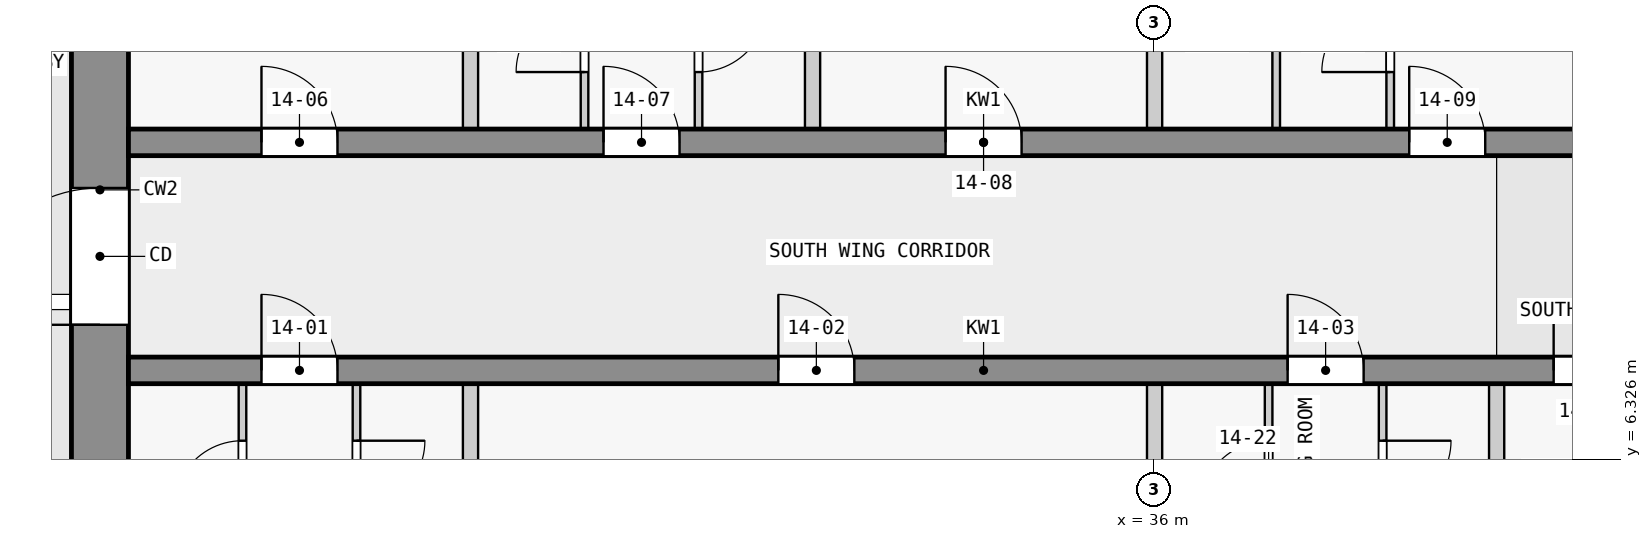
"""IFC4 building model, lengths in metres.
Left out: names, types, materials, properties, quantities, classifications, styles, units other than length and angle.
Written with IfcOpenShell. Run it as: python <this file> out.ifc"""

import sys

from ifc_helpers import new_model, si_unit, direction, frame, frame_2d, origin, place, context, subcontext, project, spatial, rectangle, extrude, element, fill, save


model = new_model("IFC4")
c1 = context("Model", 3, precision=1e-05, world=origin(), true_north=direction((0.0, 1.0)))
c2 = subcontext(c1, "Body", "Model", "MODEL_VIEW")
j1 = project(units=[si_unit("LENGTHUNIT", "METRE"), si_unit("PLANEANGLEUNIT", "RADIAN")], contexts=[c1])
p1 = place(None, origin())
s1 = spatial("IfcSite", under=j1, at=p1, CompositionType="ELEMENT")
p2 = place(p1, origin())
s2 = spatial("IfcBuilding", under=s1, at=p2, CompositionType="ELEMENT")
p3 = place(p2, frame((0.0, 0.0, 58.3)))
s3 = spatial("IfcBuildingStorey", under=s2, at=p3, CompositionType="ELEMENT", Elevation=58.3)
p4 = place(p3, frame((22.125, 2.5, 0.0), z_axis=(0.0, 0.0, 1.0), x_axis=(0.0, 1.0, 0.0)))
e1 = element("IfcWall", 1, at=p4, inside=s3, PredefinedType="SHEAR", context=c2, shape_type="SweptSolid", body=[
    extrude(rectangle(XDim=14.75, YDim=0.75, at=frame_2d((7.375, 0.0))), origin(), (0.0, 0.0, 1.0), 3.25),
])
p5 = place(p4, frame((5.6, 0.0, 0.0)))
e2 = element("IfcOpeningElement", 2, at=p5, cuts=e1, PredefinedType="OPENING", context=c2, shape_type="SweptSolid", body=[
    extrude(rectangle(XDim=1.8, YDim=2.1, at=frame_2d((0.9, 1.05))), frame((0.0, 0.385, 0.0), z_axis=(0.0, -1.0, 0.0), x_axis=(1.0, 0.0, 0.0)), (0.0, 0.0, 1.0), 0.77),
])
p6 = place(p3, frame((22.5, 7.5, 0.0), z_axis=(0.0, 0.0, 1.0), x_axis=(1.0, 0.0, 0.0)))
e3 = element("IfcWall", 3, at=p6, inside=s3, PredefinedType="SHEAR", context=c2, shape_type="SweptSolid", body=[
    extrude(rectangle(XDim=22.5, YDim=0.35, at=frame_2d((11.25, 0.0))), origin(), (0.0, 0.0, 1.0), 3.25),
])
p7 = place(p6, frame((1.75, 0.0, 0.0)))
e4 = element("IfcOpeningElement", 4, at=p7, cuts=e3, PredefinedType="OPENING", context=c2, shape_type="SweptSolid", body=[
    extrude(rectangle(XDim=1.0, YDim=2.1, at=frame_2d((0.5, 1.05))), frame((0.0, 0.185, 0.0), z_axis=(0.0, -1.0, 0.0), x_axis=(1.0, 0.0, 0.0)), (0.0, 0.0, 1.0), 0.37),
])
p8 = place(p6, frame((8.55, 0.0, 0.0)))
e5 = element("IfcOpeningElement", 5, at=p8, cuts=e3, PredefinedType="OPENING", context=c2, shape_type="SweptSolid", body=[
    extrude(rectangle(XDim=1.0, YDim=2.1, at=frame_2d((0.5, 1.05))), frame((0.0, 0.185, 0.0), z_axis=(0.0, -1.0, 0.0), x_axis=(1.0, 0.0, 0.0)), (0.0, 0.0, 1.0), 0.37),
])
p9 = place(p6, frame((15.25, 0.0, 0.0)))
e6 = element("IfcOpeningElement", 6, at=p9, cuts=e3, PredefinedType="OPENING", context=c2, shape_type="SweptSolid", body=[
    extrude(rectangle(XDim=1.0, YDim=2.1, at=frame_2d((0.5, 1.05))), frame((0.0, 0.185, 0.0), z_axis=(0.0, -1.0, 0.0), x_axis=(1.0, 0.0, 0.0)), (0.0, 0.0, 1.0), 0.37),
])
p10 = place(p6, frame((18.75, 0.0, 0.0)))
e7 = element("IfcOpeningElement", 7, at=p10, cuts=e3, PredefinedType="OPENING", context=c2, shape_type="SweptSolid", body=[
    extrude(rectangle(XDim=0.9, YDim=2.1, at=frame_2d((0.45, 1.05))), frame((0.0, 0.185, 0.0), z_axis=(0.0, -1.0, 0.0), x_axis=(1.0, 0.0, 0.0)), (0.0, 0.0, 1.0), 0.37),
])
p11 = place(p6, frame((20.95, 0.0, 0.0)))
e8 = element("IfcOpeningElement", 8, at=p11, cuts=e3, PredefinedType="OPENING", context=c2, shape_type="SweptSolid", body=[
    extrude(rectangle(XDim=1.0, YDim=2.1, at=frame_2d((0.5, 1.05))), frame((0.0, 0.185, 0.0), z_axis=(0.0, -1.0, 0.0), x_axis=(1.0, 0.0, 0.0)), (0.0, 0.0, 1.0), 0.37),
])
p12 = place(p3, frame((22.5, 10.5, 0.0), z_axis=(0.0, 0.0, 1.0), x_axis=(1.0, 0.0, 0.0)))
e9 = element("IfcWall", 9, at=p12, inside=s3, PredefinedType="SHEAR", context=c2, shape_type="SweptSolid", body=[
    extrude(rectangle(XDim=22.5, YDim=0.35, at=frame_2d((11.25, 0.0))), origin(), (0.0, 0.0, 1.0), 3.25),
])
p13 = place(p12, frame((1.75, 0.0, 0.0)))
e10 = element("IfcOpeningElement", 10, at=p13, cuts=e9, PredefinedType="OPENING", context=c2, shape_type="SweptSolid", body=[
    extrude(rectangle(XDim=1.0, YDim=2.1, at=frame_2d((0.5, 1.05))), frame((0.0, 0.185, 0.0), z_axis=(0.0, -1.0, 0.0), x_axis=(1.0, 0.0, 0.0)), (0.0, 0.0, 1.0), 0.37),
])
p14 = place(p12, frame((6.25, 0.0, 0.0)))
e11 = element("IfcOpeningElement", 11, at=p14, cuts=e9, PredefinedType="OPENING", context=c2, shape_type="SweptSolid", body=[
    extrude(rectangle(XDim=1.0, YDim=2.1, at=frame_2d((0.5, 1.05))), frame((0.0, 0.185, 0.0), z_axis=(0.0, -1.0, 0.0), x_axis=(1.0, 0.0, 0.0)), (0.0, 0.0, 1.0), 0.37),
])
p15 = place(p12, frame((10.75, 0.0, 0.0)))
e12 = element("IfcOpeningElement", 12, at=p15, cuts=e9, PredefinedType="OPENING", context=c2, shape_type="SweptSolid", body=[
    extrude(rectangle(XDim=1.0, YDim=2.1, at=frame_2d((0.5, 1.05))), frame((0.0, 0.185, 0.0), z_axis=(0.0, -1.0, 0.0), x_axis=(1.0, 0.0, 0.0)), (0.0, 0.0, 1.0), 0.37),
])
p16 = place(p12, frame((16.85, 0.0, 0.0)))
e13 = element("IfcOpeningElement", 13, at=p16, cuts=e9, PredefinedType="OPENING", context=c2, shape_type="SweptSolid", body=[
    extrude(rectangle(XDim=1.0, YDim=2.1, at=frame_2d((0.5, 1.05))), frame((0.0, 0.185, 0.0), z_axis=(0.0, -1.0, 0.0), x_axis=(1.0, 0.0, 0.0)), (0.0, 0.0, 1.0), 0.37),
])
p17 = place(p3, frame((24.0, 4.925, 0.0), z_axis=(0.0, 0.0, 1.0), x_axis=(0.0, 1.0, 0.0)))
e14 = element("IfcWall", 14, at=p17, inside=s3, PredefinedType="PARTITIONING", context=c2, shape_type="SweptSolid", body=[
    extrude(rectangle(XDim=2.4, YDim=0.1, at=frame_2d((1.2, 0.0))), origin(), (0.0, 0.0, 1.0), 3.25),
])
p18 = place(p17, frame((0.75, 0.0, 0.0)))
e15 = element("IfcOpeningElement", 15, at=p18, cuts=e14, PredefinedType="OPENING", context=c2, shape_type="SweptSolid", body=[
    extrude(rectangle(XDim=0.9, YDim=2.1, at=frame_2d((0.45, 1.05))), frame((0.0, 0.06, 0.0), z_axis=(0.0, -1.0, 0.0), x_axis=(1.0, 0.0, 0.0)), (0.0, 0.0, 1.0), 0.12),
])
p19 = place(p3, frame((25.5, 7.325, 0.0), z_axis=(0.0, 0.0, 1.0), x_axis=(0.0, -1.0, 0.0)))
e16 = element("IfcWall", 16, at=p19, inside=s3, PredefinedType="PARTITIONING", context=c2, shape_type="SweptSolid", body=[
    extrude(rectangle(XDim=2.4, YDim=0.1, at=frame_2d((1.2, 0.0))), origin(), (0.0, 0.0, 1.0), 3.25),
])
p20 = place(p19, frame((0.75, 0.0, 0.0)))
e17 = element("IfcOpeningElement", 17, at=p20, cuts=e16, PredefinedType="OPENING", context=c2, shape_type="SweptSolid", body=[
    extrude(rectangle(XDim=0.9, YDim=2.1, at=frame_2d((0.45, 1.05))), frame((0.0, 0.06, 0.0), z_axis=(0.0, -1.0, 0.0), x_axis=(1.0, 0.0, 0.0)), (0.0, 0.0, 1.0), 0.12),
])
p21 = place(p3, frame((27.0, 5.025, 0.0), z_axis=(0.0, 0.0, 1.0), x_axis=(0.0, 1.0, 0.0)))
e18 = element("IfcWall", 18, at=p21, inside=s3, PredefinedType="PARTITIONING", context=c2, shape_type="SweptSolid", body=[
    extrude(rectangle(XDim=2.3, YDim=0.2, at=frame_2d((1.15, 0.0))), origin(), (0.0, 0.0, 1.0), 3.25),
])
p22 = place(p3, frame((27.0, 10.675, 0.0), z_axis=(0.0, 0.0, 1.0), x_axis=(0.0, 1.0, 0.0)))
e19 = element("IfcWall", 19, at=p22, inside=s3, PredefinedType="PARTITIONING", context=c2, shape_type="SweptSolid", body=[
    extrude(rectangle(XDim=5.798, YDim=0.2, at=frame_2d((2.899, 0.0))), origin(), (0.0, 0.0, 1.0), 3.25),
])
p23 = place(p3, frame((28.5, 10.675, 0.0), z_axis=(0.0, 0.0, 1.0), x_axis=(0.0, 1.0, 0.0)))
e20 = element("IfcWall", 20, at=p23, inside=s3, PredefinedType="PARTITIONING", context=c2, shape_type="SweptSolid", body=[
    extrude(rectangle(XDim=2.4, YDim=0.1, at=frame_2d((1.2, 0.0))), origin(), (0.0, 0.0, 1.0), 3.25),
])
p24 = place(p23, frame((0.75, 0.0, 0.0)))
e21 = element("IfcOpeningElement", 21, at=p24, cuts=e20, PredefinedType="OPENING", context=c2, shape_type="SweptSolid", body=[
    extrude(rectangle(XDim=0.9, YDim=2.1, at=frame_2d((0.45, 1.05))), frame((0.0, 0.06, 0.0), z_axis=(0.0, -1.0, 0.0), x_axis=(1.0, 0.0, 0.0)), (0.0, 0.0, 1.0), 0.12),
])
p25 = place(p3, frame((30.0, 13.075, 0.0), z_axis=(0.0, 0.0, 1.0), x_axis=(0.0, -1.0, 0.0)))
e22 = element("IfcWall", 22, at=p25, inside=s3, PredefinedType="PARTITIONING", context=c2, shape_type="SweptSolid", body=[
    extrude(rectangle(XDim=2.4, YDim=0.1, at=frame_2d((1.2, 0.0))), origin(), (0.0, 0.0, 1.0), 3.25),
])
p26 = place(p25, frame((0.75, 0.0, 0.0)))
e23 = element("IfcOpeningElement", 23, at=p26, cuts=e22, PredefinedType="OPENING", context=c2, shape_type="SweptSolid", body=[
    extrude(rectangle(XDim=0.9, YDim=2.1, at=frame_2d((0.45, 1.05))), frame((0.0, 0.06, 0.0), z_axis=(0.0, -1.0, 0.0), x_axis=(1.0, 0.0, 0.0)), (0.0, 0.0, 1.0), 0.12),
])
p27 = place(p3, frame((31.5, 10.675, 0.0), z_axis=(0.0, 0.0, 1.0), x_axis=(0.0, 1.0, 0.0)))
e24 = element("IfcWall", 24, at=p27, inside=s3, PredefinedType="PARTITIONING", context=c2, shape_type="SweptSolid", body=[
    extrude(rectangle(XDim=2.3, YDim=0.2, at=frame_2d((1.15, 0.0))), origin(), (0.0, 0.0, 1.0), 3.25),
])
for number, where, z_axis, x_axis in (
    (25, (36.0, 1.4, 0.0), (0.0, 0.0, 1.0), (0.0, 1.0, 0.0)),
    (26, (36.0, 10.675, 0.0), (0.0, 0.0, 1.0), (0.0, 1.0, 0.0)),
):
    element("IfcWall", number, at=place(p3, frame(where, z_axis=z_axis, x_axis=x_axis)), inside=s3, PredefinedType="PARTITIONING", context=c2, shape_type="SweptSolid", body=[
        extrude(rectangle(XDim=5.925, YDim=0.2, at=frame_2d((2.962, 0.0))), origin(), (0.0, 0.0, 1.0), 3.25),
    ])
p28 = place(p3, frame((37.5, 4.925, 0.0), z_axis=(0.0, 0.0, 1.0), x_axis=(0.0, 1.0, 0.0)))
e27 = element("IfcWall", 27, at=p28, inside=s3, PredefinedType="PARTITIONING", context=c2, shape_type="SweptSolid", body=[
    extrude(rectangle(XDim=2.4, YDim=0.1, at=frame_2d((1.2, 0.0))), origin(), (0.0, 0.0, 1.0), 3.25),
])
p29 = place(p28, frame((0.75, 0.0, 0.0)))
e28 = element("IfcOpeningElement", 28, at=p29, cuts=e27, PredefinedType="OPENING", context=c2, shape_type="SweptSolid", body=[
    extrude(rectangle(XDim=0.9, YDim=2.1, at=frame_2d((0.45, 1.05))), frame((0.0, 0.06, 0.0), z_axis=(0.0, -1.0, 0.0), x_axis=(1.0, 0.0, 0.0)), (0.0, 0.0, 1.0), 0.12),
])
p30 = place(p3, frame((37.6, 10.675, 0.0), z_axis=(0.0, 0.0, 1.0), x_axis=(0.0, 1.0, 0.0)))
e29 = element("IfcWall", 29, at=p30, inside=s3, PredefinedType="PARTITIONING", context=c2, shape_type="SweptSolid", body=[
    extrude(rectangle(XDim=2.35, YDim=0.1, at=frame_2d((1.175, 0.0))), origin(), (0.0, 0.0, 1.0), 3.25),
])
p31 = place(p3, frame((39.0, 7.325, 0.0), z_axis=(0.0, 0.0, 1.0), x_axis=(0.0, -1.0, 0.0)))
e30 = element("IfcWall", 30, at=p31, inside=s3, PredefinedType="PARTITIONING", context=c2, shape_type="SweptSolid", body=[
    extrude(rectangle(XDim=2.4, YDim=0.1, at=frame_2d((1.2, 0.0))), origin(), (0.0, 0.0, 1.0), 3.25),
])
p32 = place(p31, frame((0.75, 0.0, 0.0)))
e31 = element("IfcOpeningElement", 31, at=p32, cuts=e30, PredefinedType="OPENING", context=c2, shape_type="SweptSolid", body=[
    extrude(rectangle(XDim=0.9, YDim=2.1, at=frame_2d((0.45, 1.05))), frame((0.0, 0.06, 0.0), z_axis=(0.0, -1.0, 0.0), x_axis=(1.0, 0.0, 0.0)), (0.0, 0.0, 1.0), 0.12),
])
p33 = place(p3, frame((39.1, 10.675, 0.0), z_axis=(0.0, 0.0, 1.0), x_axis=(0.0, 1.0, 0.0)))
e32 = element("IfcWall", 32, at=p33, inside=s3, PredefinedType="PARTITIONING", context=c2, shape_type="SweptSolid", body=[
    extrude(rectangle(XDim=2.35, YDim=0.1, at=frame_2d((1.175, 0.0))), origin(), (0.0, 0.0, 1.0), 3.25),
])
p34 = place(p33, frame((0.75, 0.0, 0.0)))
e33 = element("IfcOpeningElement", 33, at=p34, cuts=e32, PredefinedType="OPENING", context=c2, shape_type="SweptSolid", body=[
    extrude(rectangle(XDim=0.9, YDim=2.1, at=frame_2d((0.45, 1.05))), frame((0.0, 0.06, 0.0), z_axis=(0.0, -1.0, 0.0), x_axis=(1.0, 0.0, 0.0)), (0.0, 0.0, 1.0), 0.12),
])
p35 = place(p3, frame((40.5, 5.025, 0.0), z_axis=(0.0, 0.0, 1.0), x_axis=(0.0, 1.0, 0.0)))
e34 = element("IfcWall", 34, at=p35, inside=s3, PredefinedType="PARTITIONING", context=c2, shape_type="SweptSolid", body=[
    extrude(rectangle(XDim=2.3, YDim=0.2, at=frame_2d((1.15, 0.0))), origin(), (0.0, 0.0, 1.0), 3.25),
])
p36 = place(p5, origin())
e35 = element("IfcDoor", 35, at=p36, inside=s3, OperationType="DOUBLE_DOOR_SINGLE_SWING", PredefinedType="DOOR", context=c2, shape_type="SweptSolid", body=[
    extrude(rectangle(XDim=1.8, YDim=2.1, at=frame_2d((0.9, 1.05))), frame((0.0, 0.025, 0.0), z_axis=(0.0, -1.0, 0.0), x_axis=(1.0, 0.0, 0.0)), (0.0, 0.0, 1.0), 0.05),
])
fill(e2, e35)
p37 = place(p7, origin())
e36 = element("IfcDoor", 36, at=p37, inside=s3, OperationType="SINGLE_SWING_LEFT", PredefinedType="DOOR", context=c2, shape_type="SweptSolid", body=[
    extrude(rectangle(XDim=1.0, YDim=2.1, at=frame_2d((0.5, 1.05))), frame((0.0, 0.025, 0.0), z_axis=(0.0, -1.0, 0.0), x_axis=(1.0, 0.0, 0.0)), (0.0, 0.0, 1.0), 0.05),
])
fill(e4, e36)
p38 = place(p8, origin())
e37 = element("IfcDoor", 37, at=p38, inside=s3, OperationType="SINGLE_SWING_LEFT", PredefinedType="DOOR", context=c2, shape_type="SweptSolid", body=[
    extrude(rectangle(XDim=1.0, YDim=2.1, at=frame_2d((0.5, 1.05))), frame((0.0, 0.025, 0.0), z_axis=(0.0, -1.0, 0.0), x_axis=(1.0, 0.0, 0.0)), (0.0, 0.0, 1.0), 0.05),
])
fill(e5, e37)
p39 = place(p9, origin())
e38 = element("IfcDoor", 38, at=p39, inside=s3, OperationType="SINGLE_SWING_RIGHT", PredefinedType="DOOR", context=c2, shape_type="SweptSolid", body=[
    extrude(rectangle(XDim=1.0, YDim=2.1, at=frame_2d((0.5, 1.05))), frame((0.0, 0.025, 0.0), z_axis=(0.0, -1.0, 0.0), x_axis=(1.0, 0.0, 0.0)), (0.0, 0.0, 1.0), 0.05),
])
fill(e6, e38)
p40 = place(p10, origin())
e39 = element("IfcDoor", 39, at=p40, inside=s3, OperationType="SINGLE_SWING_RIGHT", PredefinedType="DOOR", context=c2, shape_type="SweptSolid", body=[
    extrude(rectangle(XDim=0.9, YDim=2.1, at=frame_2d((0.45, 1.05))), frame((0.0, 0.025, 0.0), z_axis=(0.0, -1.0, 0.0), x_axis=(1.0, 0.0, 0.0)), (0.0, 0.0, 1.0), 0.05),
])
fill(e7, e39)
p41 = place(p13, origin())
e40 = element("IfcDoor", 40, at=p41, inside=s3, OperationType="SINGLE_SWING_LEFT", PredefinedType="DOOR", context=c2, shape_type="SweptSolid", body=[
    extrude(rectangle(XDim=1.0, YDim=2.1, at=frame_2d((0.5, 1.05))), frame((0.0, 0.025, 0.0), z_axis=(0.0, -1.0, 0.0), x_axis=(1.0, 0.0, 0.0)), (0.0, 0.0, 1.0), 0.05),
])
fill(e10, e40)
p42 = place(p14, origin())
e41 = element("IfcDoor", 41, at=p42, inside=s3, OperationType="SINGLE_SWING_LEFT", PredefinedType="DOOR", context=c2, shape_type="SweptSolid", body=[
    extrude(rectangle(XDim=1.0, YDim=2.1, at=frame_2d((0.5, 1.05))), frame((0.0, 0.025, 0.0), z_axis=(0.0, -1.0, 0.0), x_axis=(1.0, 0.0, 0.0)), (0.0, 0.0, 1.0), 0.05),
])
fill(e11, e41)
p43 = place(p15, origin())
e42 = element("IfcDoor", 42, at=p43, inside=s3, OperationType="SINGLE_SWING_LEFT", PredefinedType="DOOR", context=c2, shape_type="SweptSolid", body=[
    extrude(rectangle(XDim=1.0, YDim=2.1, at=frame_2d((0.5, 1.05))), frame((0.0, 0.025, 0.0), z_axis=(0.0, -1.0, 0.0), x_axis=(1.0, 0.0, 0.0)), (0.0, 0.0, 1.0), 0.05),
])
fill(e12, e42)
p44 = place(p16, origin())
e43 = element("IfcDoor", 43, at=p44, inside=s3, OperationType="SINGLE_SWING_RIGHT", PredefinedType="DOOR", context=c2, shape_type="SweptSolid", body=[
    extrude(rectangle(XDim=1.0, YDim=2.1, at=frame_2d((0.5, 1.05))), frame((0.0, 0.025, 0.0), z_axis=(0.0, -1.0, 0.0), x_axis=(1.0, 0.0, 0.0)), (0.0, 0.0, 1.0), 0.05),
])
fill(e13, e43)
p45 = place(p18, origin())
e44 = element("IfcDoor", 44, at=p45, inside=s3, OperationType="SINGLE_SWING_LEFT", PredefinedType="DOOR", context=c2, shape_type="SweptSolid", body=[
    extrude(rectangle(XDim=0.9, YDim=2.1, at=frame_2d((0.45, 1.05))), frame((0.0, 0.025, 0.0), z_axis=(0.0, -1.0, 0.0), x_axis=(1.0, 0.0, 0.0)), (0.0, 0.0, 1.0), 0.05),
])
fill(e15, e44)
p46 = place(p20, origin())
e45 = element("IfcDoor", 45, at=p46, inside=s3, OperationType="SINGLE_SWING_LEFT", PredefinedType="DOOR", context=c2, shape_type="SweptSolid", body=[
    extrude(rectangle(XDim=0.9, YDim=2.1, at=frame_2d((0.45, 1.05))), frame((0.0, 0.025, 0.0), z_axis=(0.0, -1.0, 0.0), x_axis=(1.0, 0.0, 0.0)), (0.0, 0.0, 1.0), 0.05),
])
fill(e17, e45)
p47 = place(p29, origin())
e46 = element("IfcDoor", 46, at=p47, inside=s3, OperationType="SINGLE_SWING_LEFT", PredefinedType="DOOR", context=c2, shape_type="SweptSolid", body=[
    extrude(rectangle(XDim=0.9, YDim=2.1, at=frame_2d((0.45, 1.05))), frame((0.0, 0.025, 0.0), z_axis=(0.0, -1.0, 0.0), x_axis=(1.0, 0.0, 0.0)), (0.0, 0.0, 1.0), 0.05),
])
fill(e28, e46)
p48 = place(p32, origin())
e47 = element("IfcDoor", 47, at=p48, inside=s3, OperationType="SINGLE_SWING_LEFT", PredefinedType="DOOR", context=c2, shape_type="SweptSolid", body=[
    extrude(rectangle(XDim=0.9, YDim=2.1, at=frame_2d((0.45, 1.05))), frame((0.0, 0.025, 0.0), z_axis=(0.0, -1.0, 0.0), x_axis=(1.0, 0.0, 0.0)), (0.0, 0.0, 1.0), 0.05),
])
fill(e31, e47)
p49 = place(p24, origin())
e48 = element("IfcDoor", 48, at=p49, inside=s3, OperationType="SINGLE_SWING_RIGHT", PredefinedType="DOOR", context=c2, shape_type="SweptSolid", body=[
    extrude(rectangle(XDim=0.9, YDim=2.1, at=frame_2d((0.45, 1.05))), frame((0.0, 0.025, 0.0), z_axis=(0.0, -1.0, 0.0), x_axis=(1.0, 0.0, 0.0)), (0.0, 0.0, 1.0), 0.05),
])
fill(e21, e48)
p50 = place(p26, origin())
e49 = element("IfcDoor", 49, at=p50, inside=s3, OperationType="SINGLE_SWING_RIGHT", PredefinedType="DOOR", context=c2, shape_type="SweptSolid", body=[
    extrude(rectangle(XDim=0.9, YDim=2.1, at=frame_2d((0.45, 1.05))), frame((0.0, 0.025, 0.0), z_axis=(0.0, -1.0, 0.0), x_axis=(1.0, 0.0, 0.0)), (0.0, 0.0, 1.0), 0.05),
])
fill(e23, e49)
p51 = place(p34, origin())
e50 = element("IfcDoor", 50, at=p51, inside=s3, OperationType="SINGLE_SWING_RIGHT", PredefinedType="DOOR", context=c2, shape_type="SweptSolid", body=[
    extrude(rectangle(XDim=0.9, YDim=2.1, at=frame_2d((0.45, 1.05))), frame((0.0, 0.025, 0.0), z_axis=(0.0, -1.0, 0.0), x_axis=(1.0, 0.0, 0.0)), (0.0, 0.0, 1.0), 0.05),
])
fill(e33, e50)
save(model, sys.argv[1])
